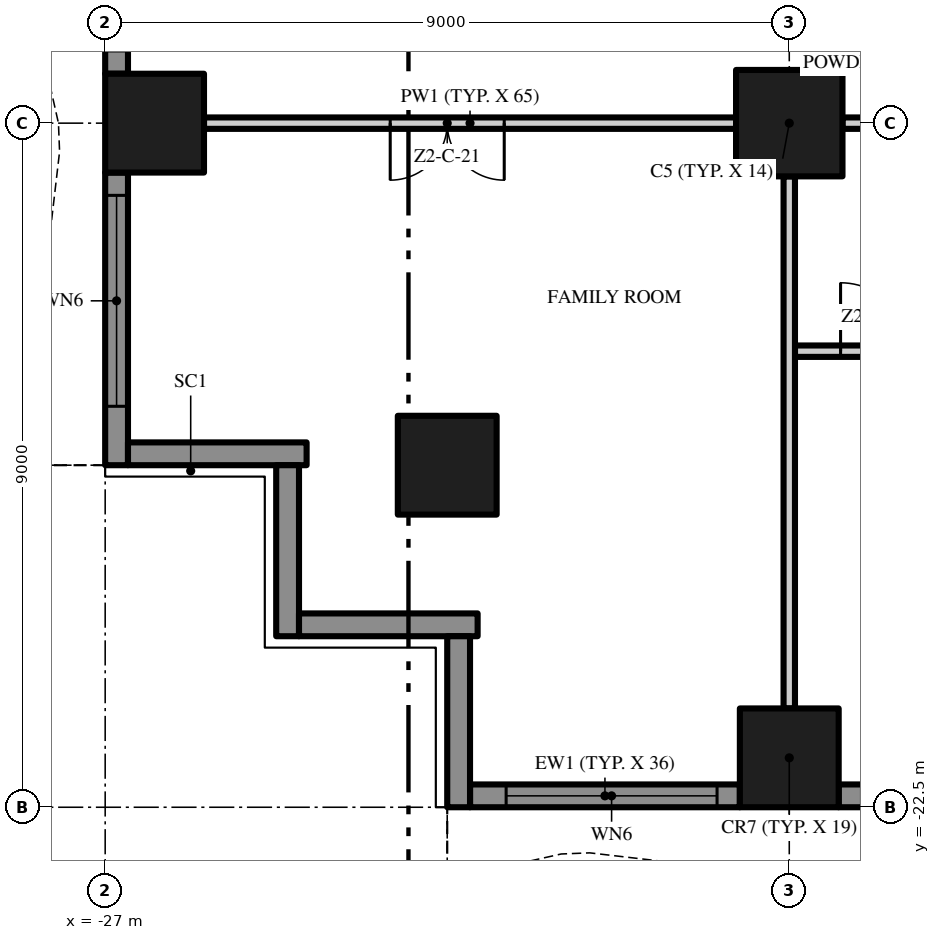
"""IFC4 building model, lengths in metres.
Left out: names, types, materials, properties, quantities, classifications, styles, units other than length and angle.
Written with IfcOpenShell. Run it as: python <this file> out.ifc"""

import sys

from ifc_helpers import new_model, si_unit, direction, frame, frame_2d, origin, origin_2d, place, context, subcontext, project, spatial, polyline, rectangle, outline, extrude, element, fill, save


model = new_model("IFC4")
c1 = context("Model", 3, precision=1e-05, world=origin(), true_north=direction((0.0, 1.0)))
c2 = subcontext(c1, "Body", "Model", "MODEL_VIEW")
j1 = project(units=[si_unit("LENGTHUNIT", "METRE"), si_unit("PLANEANGLEUNIT", "RADIAN")], contexts=[c1])
p1 = place(None, origin())
s1 = spatial("IfcSite", under=j1, at=p1, CompositionType="ELEMENT")
p2 = place(p1, origin())
s2 = spatial("IfcBuilding", under=s1, at=p2, CompositionType="ELEMENT")
p3 = place(p2, frame((0.0, 0.0, 96.0)))
s3 = spatial("IfcBuildingStorey", under=s2, at=p3, CompositionType="ELEMENT", Elevation=96.0)
p4 = place(p3, frame((-18.0, -13.5, 0.0), z_axis=(0.0, 0.0, 1.0), x_axis=(1.0, 0.0, 0.0)))
e1 = element("IfcColumn", 1, at=p4, inside=s3, PredefinedType="COLUMN", context=c2, shape_type="SweptSolid", body=[
    extrude(rectangle(XDim=1.4, YDim=1.4, at=origin_2d()), origin(), (0.0, 0.0, 1.0), 3.5),
])
for number, where, z_axis, x_axis in (
    (2, (-18.0, -21.85, 0.0), (0.0, 0.0, 1.0), (1.0, 0.0, 0.0)),
    (3, (-26.35, -13.5, 0.0), (0.0, 0.0, 1.0), (1.0, 0.0, 0.0)),
    (4, (-22.5, -18.0, 0.0), (0.0, 0.0, 1.0), (1.0, 0.0, 0.0)),
):
    element("IfcColumn", number, at=place(p3, frame(where, z_axis=z_axis, x_axis=x_axis)), inside=s3, PredefinedType="COLUMN", context=c2, shape_type="SweptSolid", body=[
        extrude(rectangle(XDim=1.3, YDim=1.3, at=origin_2d()), origin(), (0.0, 0.0, 1.0), 3.5),
    ])
p5 = place(p3, frame((-18.65, -22.35, 0.0), z_axis=(0.0, 0.0, 1.0), x_axis=(-1.0, 0.0, 0.0)))
e5 = element("IfcWall", 5, at=p5, inside=s3, PredefinedType="SOLIDWALL", context=c2, shape_type="SweptSolid", body=[
    extrude(rectangle(XDim=3.55, YDim=0.3, at=frame_2d((1.775, 0.0))), origin(), (0.0, 0.0, 1.0), 3.5),
])
p6 = place(p5, frame((0.3, 0.0, 0.45)))
e6 = element("IfcOpeningElement", 6, at=p6, cuts=e5, PredefinedType="OPENING", context=c2, shape_type="SweptSolid", body=[
    extrude(rectangle(XDim=2.775, YDim=2.65, at=frame_2d((1.387, 1.325))), frame((0.0, 0.16, 0.0), z_axis=(0.0, -1.0, 0.0), x_axis=(1.0, 0.0, 0.0)), (0.0, 0.0, 1.0), 0.32),
])
p7 = place(p3, frame((-9.65, -22.35, 0.0), z_axis=(0.0, 0.0, 1.0), x_axis=(-1.0, 0.0, 0.0)))
e7 = element("IfcWall", 7, at=p7, inside=s3, PredefinedType="SOLIDWALL", context=c2, shape_type="SweptSolid", body=[
    extrude(rectangle(XDim=7.7, YDim=0.3, at=frame_2d((3.85, 0.0))), origin(), (0.0, 0.0, 1.0), 3.5),
])
p8 = place(p7, frame((4.625, 0.0, 0.0)))
e8 = element("IfcOpeningElement", 8, at=p8, cuts=e7, PredefinedType="OPENING", context=c2, shape_type="SweptSolid", body=[
    extrude(rectangle(XDim=2.775, YDim=2.4, at=frame_2d((1.387, 1.2))), frame((0.0, 0.16, 0.0), z_axis=(0.0, -1.0, 0.0), x_axis=(1.0, 0.0, 0.0)), (0.0, 0.0, 1.0), 0.32),
])
p9 = place(p7, frame((0.3, 0.0, 0.0)))
e9 = element("IfcOpeningElement", 9, at=p9, cuts=e7, PredefinedType="OPENING", context=c2, shape_type="SweptSolid", body=[
    extrude(rectangle(XDim=2.775, YDim=2.4, at=frame_2d((1.387, 1.2))), frame((0.0, 0.16, 0.0), z_axis=(0.0, -1.0, 0.0), x_axis=(1.0, 0.0, 0.0)), (0.0, 0.0, 1.0), 0.32),
])
p10 = place(p3, frame((-26.85, -12.85, 0.0), z_axis=(0.0, 0.0, 1.0), x_axis=(0.0, 1.0, 0.0)))
e10 = element("IfcWall", 10, at=p10, inside=s3, PredefinedType="SOLIDWALL", context=c2, shape_type="SweptSolid", body=[
    extrude(rectangle(XDim=7.7, YDim=0.3, at=frame_2d((3.85, 0.0))), origin(), (0.0, 0.0, 1.0), 3.5),
])
p11 = place(p10, frame((4.625, 0.0, 0.0)))
e11 = element("IfcOpeningElement", 11, at=p11, cuts=e10, PredefinedType="OPENING", context=c2, shape_type="SweptSolid", body=[
    extrude(rectangle(XDim=2.775, YDim=2.4, at=frame_2d((1.387, 1.2))), frame((0.0, 0.16, 0.0), z_axis=(0.0, -1.0, 0.0), x_axis=(1.0, 0.0, 0.0)), (0.0, 0.0, 1.0), 0.32),
])
p12 = place(p10, frame((0.3, 0.0, 0.45)))
e12 = element("IfcOpeningElement", 12, at=p12, cuts=e10, PredefinedType="OPENING", context=c2, shape_type="SweptSolid", body=[
    extrude(rectangle(XDim=2.775, YDim=2.65, at=frame_2d((1.387, 1.325))), frame((0.0, 0.16, 0.0), z_axis=(0.0, -1.0, 0.0), x_axis=(1.0, 0.0, 0.0)), (0.0, 0.0, 1.0), 0.32),
])
p13 = place(p3, frame((-26.85, -18.0, 0.0), z_axis=(0.0, 0.0, 1.0), x_axis=(0.0, 1.0, 0.0)))
e13 = element("IfcWall", 13, at=p13, inside=s3, PredefinedType="SOLIDWALL", context=c2, shape_type="SweptSolid", body=[
    extrude(rectangle(XDim=3.85, YDim=0.3, at=frame_2d((1.925, 0.0))), origin(), (0.0, 0.0, 1.0), 3.5),
])
p14 = place(p13, frame((0.775, 0.0, 0.45)))
e14 = element("IfcOpeningElement", 14, at=p14, cuts=e13, PredefinedType="OPENING", context=c2, shape_type="SweptSolid", body=[
    extrude(rectangle(XDim=2.775, YDim=2.65, at=frame_2d((1.387, 1.325))), frame((0.0, 0.16, 0.0), z_axis=(0.0, -1.0, 0.0), x_axis=(1.0, 0.0, 0.0)), (0.0, 0.0, 1.0), 0.32),
])
p15 = place(p3, frame((-24.35, -17.85, 0.0), z_axis=(0.0, 0.0, 1.0), x_axis=(-1.0, 0.0, 0.0)))
e15 = element("IfcWall", 15, at=p15, inside=s3, PredefinedType="SOLIDWALL", context=c2, shape_type="SweptSolid", body=[
    extrude(rectangle(XDim=2.35, YDim=0.3, at=frame_2d((1.175, 0.0))), origin(), (0.0, 0.0, 1.0), 3.5),
])
p16 = place(p3, frame((-24.6, -20.25, 0.0), z_axis=(0.0, 0.0, 1.0), x_axis=(0.0, 1.0, 0.0)))
e16 = element("IfcWall", 16, at=p16, inside=s3, PredefinedType="SOLIDWALL", context=c2, shape_type="SweptSolid", body=[
    extrude(rectangle(XDim=2.25, YDim=0.3, at=frame_2d((1.125, 0.0))), origin(), (0.0, 0.0, 1.0), 3.5),
])
p17 = place(p3, frame((-22.1, -20.1, 0.0), z_axis=(0.0, 0.0, 1.0), x_axis=(-1.0, 0.0, 0.0)))
e17 = element("IfcWall", 17, at=p17, inside=s3, PredefinedType="SOLIDWALL", context=c2, shape_type="SweptSolid", body=[
    extrude(rectangle(XDim=2.35, YDim=0.3, at=frame_2d((1.175, 0.0))), origin(), (0.0, 0.0, 1.0), 3.5),
])
p18 = place(p3, frame((-22.35, -22.5, 0.0), z_axis=(0.0, 0.0, 1.0), x_axis=(0.0, 1.0, 0.0)))
e18 = element("IfcWall", 18, at=p18, inside=s3, PredefinedType="SOLIDWALL", context=c2, shape_type="SweptSolid", body=[
    extrude(rectangle(XDim=2.25, YDim=0.3, at=frame_2d((1.125, 0.0))), origin(), (0.0, 0.0, 1.0), 3.5),
])
p19 = place(p3, origin())
e19 = element("IfcWall", 19, at=p19, inside=s3, PredefinedType="USERDEFINED", context=c2, shape_type="SweptSolid", body=[
    extrude(outline(polyline([(-22.5, -23.451), (-21.0, -23.115), (-20.625, -23.1), (-19.5, -23.231), (-18.0, -23.755), (-16.5, -24.488), (-15.0, -25.149), (-13.5, -25.485), (-13.125, -25.5), (-12.0, -25.369), (-10.5, -24.845), (-9.0, -24.112), (-7.5, -23.451), (-6.0, -23.115), (-5.625, -23.1), (-4.5, -23.231), (-3.0, -23.755), (-1.5, -24.488), (0.0, -25.149), (1.5, -25.485), (1.875, -25.5), (3.0, -25.369), (4.5, -24.845), (6.0, -24.112), (7.5, -23.451), (9.0, -23.115), (9.375, -23.1), (10.5, -23.231), (12.0, -23.755), (13.5, -24.488), (15.0, -25.149), (16.5, -25.485), (16.875, -25.5), (18.0, -25.369), (19.5, -24.845), (21.0, -24.112), (22.5, -23.451), (22.399, -23.223), (20.895, -23.885), (19.404, -24.614), (17.944, -25.124), (16.865, -25.249), (16.533, -25.236), (15.079, -24.91), (13.605, -24.261), (12.096, -23.524), (10.556, -22.986), (9.385, -22.849), (8.967, -22.866), (7.421, -23.213), (5.895, -23.885), (4.404, -24.614), (2.944, -25.124), (1.865, -25.249), (1.533, -25.236), (0.079, -24.91), (-1.395, -24.261), (-2.904, -23.524), (-4.444, -22.986), (-5.615, -22.849), (-6.033, -22.866), (-7.579, -23.213), (-9.105, -23.885), (-10.596, -24.614), (-12.056, -25.124), (-13.135, -25.249), (-13.467, -25.236), (-14.921, -24.91), (-16.395, -24.261), (-17.904, -23.524), (-19.444, -22.986), (-20.615, -22.849), (-21.033, -22.866), (-22.555, -23.208), (-22.5, -23.451)])), origin(), (0.0, 0.0, 1.0), 0.9),
])
p20 = place(p3, origin())
e20 = element("IfcWall", 20, at=p20, inside=s3, PredefinedType="USERDEFINED", context=c2, shape_type="SweptSolid", body=[
    extrude(outline(polyline([(-27.951, 18.0), (-27.615, 16.5), (-27.6, 16.125), (-27.731, 15.0), (-28.255, 13.5), (-28.988, 12.0), (-29.649, 10.5), (-29.985, 9.0), (-30.0, 8.625), (-29.869, 7.5), (-29.345, 6.0), (-28.612, 4.5), (-27.951, 3.0), (-27.615, 1.5), (-27.6, 1.125), (-27.731, 0.0), (-28.255, -1.5), (-28.988, -3.0), (-29.649, -4.5), (-29.985, -6.0), (-30.0, -6.375), (-29.869, -7.5), (-29.345, -9.0), (-28.612, -10.5), (-27.951, -12.0), (-27.615, -13.5), (-27.6, -13.875), (-27.731, -15.0), (-28.255, -16.5), (-28.988, -18.0), (-28.763, -18.11), (-28.024, -16.596), (-27.486, -15.056), (-27.349, -13.885), (-27.366, -13.467), (-27.713, -11.921), (-28.385, -10.395), (-29.114, -8.904), (-29.624, -7.444), (-29.749, -6.365), (-29.736, -6.033), (-29.41, -4.579), (-28.761, -3.105), (-28.024, -1.596), (-27.486, -0.056), (-27.349, 1.115), (-27.366, 1.533), (-27.713, 3.079), (-28.385, 4.605), (-29.114, 6.096), (-29.624, 7.556), (-29.749, 8.635), (-29.736, 8.967), (-29.41, 10.421), (-28.761, 11.895), (-28.024, 13.404), (-27.486, 14.944), (-27.349, 16.115), (-27.366, 16.533), (-27.708, 18.055), (-27.951, 18.0)])), origin(), (0.0, 0.0, 1.0), 0.9),
])
p21 = place(p3, frame((-17.925, -16.5, 0.0), z_axis=(0.0, 0.0, 1.0), x_axis=(1.0, 0.0, 0.0)))
e21 = element("IfcWall", 21, at=p21, inside=s3, PredefinedType="PARTITIONING", context=c2, shape_type="SweptSolid", body=[
    extrude(rectangle(XDim=2.1, YDim=0.15, at=frame_2d((1.05, 0.0))), origin(), (0.0, 0.0, 1.0), 3.5),
])
p22 = place(p21, frame((0.6, 0.0, 0.0)))
e22 = element("IfcOpeningElement", 22, at=p22, cuts=e21, PredefinedType="OPENING", context=c2, shape_type="SweptSolid", body=[
    extrude(rectangle(XDim=0.9, YDim=2.1, at=frame_2d((0.45, 1.05))), frame((0.0, 0.085, 0.0), z_axis=(0.0, -1.0, 0.0), x_axis=(1.0, 0.0, 0.0)), (0.0, 0.0, 1.0), 0.17),
])
p23 = place(p3, frame((-18.7, -13.5, 0.0), z_axis=(0.0, 0.0, 1.0), x_axis=(-1.0, 0.0, 0.0)))
e23 = element("IfcWall", 23, at=p23, inside=s3, PredefinedType="PARTITIONING", context=c2, shape_type="SweptSolid", body=[
    extrude(rectangle(XDim=7.0, YDim=0.15, at=frame_2d((3.5, 0.0))), origin(), (0.0, 0.0, 1.0), 3.5),
])
p24 = place(p23, frame((3.05, 0.0, 0.0)))
e24 = element("IfcOpeningElement", 24, at=p24, cuts=e23, PredefinedType="OPENING", context=c2, shape_type="SweptSolid", body=[
    extrude(rectangle(XDim=1.5, YDim=2.4, at=frame_2d((0.75, 1.2))), frame((0.0, 0.085, 0.0), z_axis=(0.0, -1.0, 0.0), x_axis=(1.0, 0.0, 0.0)), (0.0, 0.0, 1.0), 0.17),
])
p25 = place(p3, frame((-9.7, -13.5, 0.0), z_axis=(0.0, 0.0, 1.0), x_axis=(-1.0, 0.0, 0.0)))
e25 = element("IfcWall", 25, at=p25, inside=s3, PredefinedType="PARTITIONING", context=c2, shape_type="SweptSolid", body=[
    extrude(rectangle(XDim=7.6, YDim=0.15, at=frame_2d((3.8, 0.0))), origin(), (0.0, 0.0, 1.0), 3.5),
])
p26 = place(p25, frame((4.0, 0.0, 0.0)))
e26 = element("IfcOpeningElement", 26, at=p26, cuts=e25, PredefinedType="OPENING", context=c2, shape_type="SweptSolid", body=[
    extrude(rectangle(XDim=1.8, YDim=2.4, at=frame_2d((0.9, 1.2))), frame((0.0, 0.085, 0.0), z_axis=(0.0, -1.0, 0.0), x_axis=(1.0, 0.0, 0.0)), (0.0, 0.0, 1.0), 0.17),
])
p27 = place(p3, frame((-18.0, -21.2, 0.0), z_axis=(0.0, 0.0, 1.0), x_axis=(0.0, 1.0, 0.0)))
e27 = element("IfcWall", 27, at=p27, inside=s3, PredefinedType="PARTITIONING", context=c2, shape_type="SweptSolid", body=[
    extrude(rectangle(XDim=7.0, YDim=0.15, at=frame_2d((3.5, 0.0))), origin(), (0.0, 0.0, 1.0), 3.5),
])
p28 = place(p6, origin())
e28 = element("IfcWindow", 28, at=p28, inside=s3, PartitioningType="SINGLE_PANEL", PredefinedType="WINDOW", context=c2, shape_type="SweptSolid", body=[
    extrude(rectangle(XDim=2.775, YDim=2.65, at=frame_2d((1.387, 1.325))), frame((0.0, 0.03, 0.0), z_axis=(0.0, -1.0, 0.0), x_axis=(1.0, 0.0, 0.0)), (0.0, 0.0, 1.0), 0.06),
])
fill(e6, e28)
p29 = place(p14, origin())
e29 = element("IfcWindow", 29, at=p29, inside=s3, PartitioningType="SINGLE_PANEL", PredefinedType="WINDOW", context=c2, shape_type="SweptSolid", body=[
    extrude(rectangle(XDim=2.775, YDim=2.65, at=frame_2d((1.387, 1.325))), frame((0.0, 0.03, 0.0), z_axis=(0.0, -1.0, 0.0), x_axis=(1.0, 0.0, 0.0)), (0.0, 0.0, 1.0), 0.06),
])
fill(e14, e29)
p30 = place(p24, origin())
e30 = element("IfcDoor", 30, at=p30, inside=s3, OperationType="DOUBLE_DOOR_SINGLE_SWING", PredefinedType="DOOR", context=c2, shape_type="SweptSolid", body=[
    extrude(rectangle(XDim=1.5, YDim=2.4, at=frame_2d((0.75, 1.2))), frame((0.0, 0.025, 0.0), z_axis=(0.0, -1.0, 0.0), x_axis=(1.0, 0.0, 0.0)), (0.0, 0.0, 1.0), 0.05),
])
fill(e24, e30)
p31 = place(p22, origin())
e31 = element("IfcDoor", 31, at=p31, inside=s3, OperationType="SINGLE_SWING_LEFT", PredefinedType="DOOR", context=c2, shape_type="SweptSolid", body=[
    extrude(rectangle(XDim=0.9, YDim=2.1, at=frame_2d((0.45, 1.05))), frame((0.0, 0.025, 0.0), z_axis=(0.0, -1.0, 0.0), x_axis=(1.0, 0.0, 0.0)), (0.0, 0.0, 1.0), 0.05),
])
fill(e22, e31)
save(model, sys.argv[1])
